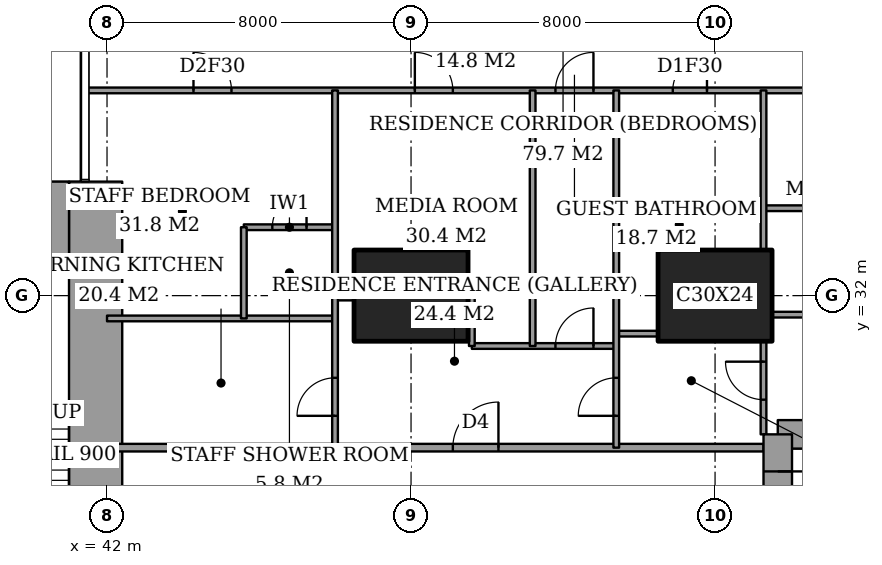
"""IFC4 building model, lengths in metres.
Left out: names, types, materials, properties, quantities, classifications, styles, units other than length and angle.
Written with IfcOpenShell. Run it as: python <this file> out.ifc"""

import sys

from ifc_helpers import new_model, si_unit, direction, frame, frame_2d, origin, origin_2d, place, context, subcontext, project, spatial, rectangle, extrude, element, fill, save


model = new_model("IFC4")
c1 = context("Model", 3, precision=1e-05, world=origin(), true_north=direction((0.0, 1.0)))
c2 = subcontext(c1, "Body", "Model", "MODEL_VIEW")
j1 = project(units=[si_unit("LENGTHUNIT", "METRE"), si_unit("PLANEANGLEUNIT", "RADIAN")], contexts=[c1])
p1 = place(None, origin())
s1 = spatial("IfcSite", under=j1, at=p1, CompositionType="ELEMENT")
p2 = place(p1, origin())
s2 = spatial("IfcBuilding", under=s1, at=p2, CompositionType="ELEMENT")
p3 = place(p2, frame((0.0, 0.0, 161.0)))
s3 = spatial("IfcBuildingStorey", under=s2, at=p3, CompositionType="ELEMENT", Elevation=161.0)
for number, where, z_axis, x_axis in (
    (1, (50.0, 32.0, 0.0), (0.0, 0.0, 1.0), (1.0, 0.0, 0.0)),
    (2, (58.0, 32.0, 0.0), (0.0, 0.0, 1.0), (1.0, 0.0, 0.0)),
):
    element("IfcColumn", number, at=place(p3, frame(where, z_axis=z_axis, x_axis=x_axis)), inside=s3, PredefinedType="COLUMN", context=c2, shape_type="SweptSolid", body=[
        extrude(rectangle(XDim=3.0, YDim=2.4, at=origin_2d()), origin(), (0.0, 0.0, 1.0), 3.6),
    ])
p4 = place(p3, frame((37.85, 34.0, 0.0), z_axis=(0.0, 0.0, 1.0), x_axis=(1.0, 0.0, 0.0)))
e3 = element("IfcWall", 3, at=p4, inside=s3, PredefinedType="SHEAR", context=c2, shape_type="SweptSolid", body=[
    extrude(rectangle(XDim=3.15, YDim=2.0, at=frame_2d((1.575, 0.0))), origin(), (0.0, 0.0, 1.0), 3.6),
])
p5 = place(p3, frame((41.7, 24.85, 0.0), z_axis=(0.0, 0.0, 1.0), x_axis=(0.0, 1.0, 0.0)))
e4 = element("IfcWall", 4, at=p5, inside=s3, PredefinedType="SHEAR", context=c2, shape_type="SweptSolid", body=[
    extrude(rectangle(XDim=10.15, YDim=1.4, at=frame_2d((5.075, 0.0))), origin(), (0.0, 0.0, 1.0), 3.6),
])
p6 = place(p3, frame((64.1, 28.35, 0.0), z_axis=(0.0, 0.0, 1.0), x_axis=(-1.0, 0.0, 0.0)))
e5 = element("IfcWall", 5, at=p6, inside=s3, PredefinedType="SHEAR", context=c2, shape_type="SweptSolid", body=[
    extrude(rectangle(XDim=4.45, YDim=0.75, at=frame_2d((2.225, 0.0))), origin(), (0.0, 0.0, 1.0), 3.6),
])
p7 = place(p3, frame((59.65, 28.35, 0.0), z_axis=(0.0, 0.0, 1.0), x_axis=(0.0, -1.0, 0.0)))
e6 = element("IfcWall", 6, at=p7, inside=s3, PredefinedType="SHEAR", context=c2, shape_type="SweptSolid", body=[
    extrude(rectangle(XDim=8.7, YDim=0.75, at=frame_2d((4.35, 0.0))), origin(), (0.0, 0.0, 1.0), 3.6),
])
p8 = place(p7, frame((0.975, 0.0, 0.0)))
e7 = element("IfcOpeningElement", 7, at=p8, cuts=e6, PredefinedType="OPENING", context=c2, shape_type="SweptSolid", body=[
    extrude(rectangle(XDim=1.0, YDim=2.1, at=frame_2d((0.5, 1.05))), frame((0.0, 0.385, 0.0), z_axis=(0.0, -1.0, 0.0), x_axis=(1.0, 0.0, 0.0)), (0.0, 0.0, 1.0), 0.77),
])
p9 = place(p3, frame((42.0, 28.0, 0.0), z_axis=(0.0, 0.0, 1.0), x_axis=(1.0, 0.0, 0.0)))
e8 = element("IfcWall", 8, at=p9, inside=s3, PredefinedType="PARTITIONING", context=c2, shape_type="SweptSolid", body=[
    extrude(rectangle(XDim=17.275, YDim=0.2, at=frame_2d((8.637, 0.0))), origin(), (0.0, 0.0, 1.0), 3.35),
])
p10 = place(p9, frame((9.1, 0.0, 0.0)))
e9 = element("IfcOpeningElement", 9, at=p10, cuts=e8, PredefinedType="OPENING", context=c2, shape_type="SweptSolid", body=[
    extrude(rectangle(XDim=1.2, YDim=2.4, at=frame_2d((0.6, 1.2))), frame((0.0, 0.11, 0.0), z_axis=(0.0, -1.0, 0.0), x_axis=(1.0, 0.0, 0.0)), (0.0, 0.0, 1.0), 0.22),
])
p11 = place(p3, frame((51.6, 30.675, 0.0), z_axis=(0.0, 0.0, 1.0), x_axis=(1.0, 0.0, 0.0)))
e10 = element("IfcWall", 10, at=p11, inside=s3, PredefinedType="PARTITIONING", context=c2, shape_type="SweptSolid", body=[
    extrude(rectangle(XDim=3.8, YDim=0.15, at=frame_2d((1.9, 0.0))), origin(), (0.0, 0.0, 1.0), 3.35),
])
p12 = place(p11, frame((2.2, 0.0, 0.0)))
e11 = element("IfcOpeningElement", 11, at=p12, cuts=e10, PredefinedType="OPENING", context=c2, shape_type="SweptSolid", body=[
    extrude(rectangle(XDim=1.0, YDim=2.1, at=frame_2d((0.5, 1.05))), frame((0.0, 0.085, 0.0), z_axis=(0.0, -1.0, 0.0), x_axis=(1.0, 0.0, 0.0)), (0.0, 0.0, 1.0), 0.17),
])
p13 = place(p3, frame((55.4, 31.0, 0.0), z_axis=(0.0, 0.0, 1.0), x_axis=(1.0, 0.0, 0.0)))
e12 = element("IfcWall", 12, at=p13, inside=s3, PredefinedType="PARTITIONING", context=c2, shape_type="SweptSolid", body=[
    extrude(rectangle(XDim=1.1, YDim=0.15, at=frame_2d((0.55, 0.0))), origin(), (0.0, 0.0, 1.0), 3.35),
])
p14 = place(p3, frame((42.0, 31.4, 0.0), z_axis=(0.0, 0.0, 1.0), x_axis=(1.0, 0.0, 0.0)))
e13 = element("IfcWall", 13, at=p14, inside=s3, PredefinedType="PARTITIONING", context=c2, shape_type="SweptSolid", body=[
    extrude(rectangle(XDim=6.0, YDim=0.15, at=frame_2d((3.0, 0.0))), origin(), (0.0, 0.0, 1.0), 3.35),
])
p15 = place(p3, frame((59.5, 31.5, 0.0), z_axis=(0.0, 0.0, 1.0), x_axis=(1.0, 0.0, 0.0)))
e14 = element("IfcWall", 14, at=p15, inside=s3, PredefinedType="PARTITIONING", context=c2, shape_type="SweptSolid", body=[
    extrude(rectangle(XDim=5.15, YDim=0.15, at=frame_2d((2.575, 0.0))), origin(), (0.0, 0.0, 1.0), 3.35),
])
p16 = place(p3, frame((48.0, 31.95, 0.0), z_axis=(0.0, 0.0, 1.0), x_axis=(1.0, 0.0, 0.0)))
e15 = element("IfcWall", 15, at=p16, inside=s3, PredefinedType="PARTITIONING", context=c2, shape_type="SweptSolid", body=[
    extrude(rectangle(XDim=0.5, YDim=0.15, at=frame_2d((0.25, 0.0))), origin(), (0.0, 0.0, 1.0), 2.634),
])
p17 = place(p3, frame((45.6, 33.8, 0.0), z_axis=(0.0, 0.0, 1.0), x_axis=(1.0, 0.0, 0.0)))
e16 = element("IfcWall", 16, at=p17, inside=s3, PredefinedType="PARTITIONING", context=c2, shape_type="SweptSolid", body=[
    extrude(rectangle(XDim=2.4, YDim=0.15, at=frame_2d((1.2, 0.0))), origin(), (0.0, 0.0, 1.0), 3.35),
])
p18 = place(p17, frame((0.75, 0.0, 0.0)))
e17 = element("IfcOpeningElement", 17, at=p18, cuts=e16, PredefinedType="OPENING", context=c2, shape_type="SweptSolid", body=[
    extrude(rectangle(XDim=0.9, YDim=2.1, at=frame_2d((0.45, 1.05))), frame((0.0, 0.085, 0.0), z_axis=(0.0, -1.0, 0.0), x_axis=(1.0, 0.0, 0.0)), (0.0, 0.0, 1.0), 0.17),
])
p19 = place(p3, frame((59.275, 34.3, 0.0), z_axis=(0.0, 0.0, 1.0), x_axis=(1.0, 0.0, 0.0)))
e18 = element("IfcWall", 18, at=p19, inside=s3, PredefinedType="PARTITIONING", context=c2, shape_type="SweptSolid", body=[
    extrude(rectangle(XDim=2.6, YDim=0.15, at=frame_2d((1.3, 0.0))), origin(), (0.0, 0.0, 1.0), 3.35),
])
p20 = place(p3, frame((41.439, 37.4, 0.0), z_axis=(0.0, 0.0, 1.0), x_axis=(1.0, 0.0, 0.0)))
e19 = element("IfcWall", 19, at=p20, inside=s3, PredefinedType="PARTITIONING", context=c2, shape_type="SweptSolid", body=[
    extrude(rectangle(XDim=25.011, YDim=0.15, at=frame_2d((12.505, 0.0))), origin(), (0.0, 0.0, 1.0), 3.35),
])
p21 = place(p20, frame((12.361, 0.0, 0.0)))
e20 = element("IfcOpeningElement", 20, at=p21, cuts=e19, PredefinedType="OPENING", context=c2, shape_type="SweptSolid", body=[
    extrude(rectangle(XDim=1.0, YDim=2.1, at=frame_2d((0.5, 1.05))), frame((0.0, 0.085, 0.0), z_axis=(0.0, -1.0, 0.0), x_axis=(1.0, 0.0, 0.0)), (0.0, 0.0, 1.0), 0.17),
])
p22 = place(p20, frame((20.924, 0.0, 0.0)))
e21 = element("IfcOpeningElement", 21, at=p22, cuts=e19, PredefinedType="OPENING", context=c2, shape_type="SweptSolid", body=[
    extrude(rectangle(XDim=1.0, YDim=2.1, at=frame_2d((0.5, 1.05))), frame((0.0, 0.085, 0.0), z_axis=(0.0, -1.0, 0.0), x_axis=(1.0, 0.0, 0.0)), (0.0, 0.0, 1.0), 0.17),
])
p23 = place(p20, frame((15.448, 0.0, 0.0)))
e22 = element("IfcOpeningElement", 22, at=p23, cuts=e19, PredefinedType="OPENING", context=c2, shape_type="SweptSolid", body=[
    extrude(rectangle(XDim=0.9, YDim=2.1, at=frame_2d((0.45, 1.05))), frame((0.0, 0.085, 0.0), z_axis=(0.0, -1.0, 0.0), x_axis=(1.0, 0.0, 0.0)), (0.0, 0.0, 1.0), 0.17),
])
p24 = place(p20, frame((8.661, 0.0, 0.0)))
e23 = element("IfcOpeningElement", 23, at=p24, cuts=e19, PredefinedType="OPENING", context=c2, shape_type="SweptSolid", body=[
    extrude(rectangle(XDim=1.0, YDim=2.1, at=frame_2d((0.5, 1.05))), frame((0.0, 0.085, 0.0), z_axis=(0.0, -1.0, 0.0), x_axis=(1.0, 0.0, 0.0)), (0.0, 0.0, 1.0), 0.17),
])
p25 = place(p20, frame((2.836, 0.0, 0.0)))
e24 = element("IfcOpeningElement", 24, at=p25, cuts=e19, PredefinedType="OPENING", context=c2, shape_type="SweptSolid", body=[
    extrude(rectangle(XDim=1.0, YDim=2.1, at=frame_2d((0.5, 1.05))), frame((0.0, 0.085, 0.0), z_axis=(0.0, -1.0, 0.0), x_axis=(1.0, 0.0, 0.0)), (0.0, 0.0, 1.0), 0.17),
])
p26 = place(p3, frame((45.6, 31.4, 0.0), z_axis=(0.0, 0.0, 1.0), x_axis=(0.0, 1.0, 0.0)))
e25 = element("IfcWall", 25, at=p26, inside=s3, PredefinedType="PARTITIONING", context=c2, shape_type="SweptSolid", body=[
    extrude(rectangle(XDim=2.4, YDim=0.15, at=frame_2d((1.2, 0.0))), origin(), (0.0, 0.0, 1.0), 3.35),
])
p27 = place(p3, frame((48.0, 28.0, 0.0), z_axis=(0.0, 0.0, 1.0), x_axis=(0.0, 1.0, 0.0)))
e26 = element("IfcWall", 26, at=p27, inside=s3, PredefinedType="PARTITIONING", context=c2, shape_type="SweptSolid", body=[
    extrude(rectangle(XDim=9.4, YDim=0.15, at=frame_2d((4.7, 0.0))), origin(), (0.0, 0.0, 1.0), 3.35),
])
p28 = place(p27, frame((0.837, 0.0, 0.0)))
e27 = element("IfcOpeningElement", 27, at=p28, cuts=e26, PredefinedType="OPENING", context=c2, shape_type="SweptSolid", body=[
    extrude(rectangle(XDim=1.0, YDim=2.1, at=frame_2d((0.5, 1.05))), frame((0.0, 0.085, 0.0), z_axis=(0.0, -1.0, 0.0), x_axis=(1.0, 0.0, 0.0)), (0.0, 0.0, 1.0), 0.17),
])
p29 = place(p3, frame((51.6, 30.675, 0.0), z_axis=(0.0, 0.0, 1.0), x_axis=(0.0, 1.0, 0.0)))
e28 = element("IfcWall", 28, at=p29, inside=s3, PredefinedType="PARTITIONING", context=c2, shape_type="SweptSolid", body=[
    extrude(rectangle(XDim=1.275, YDim=0.15, at=frame_2d((0.637, 0.0))), origin(), (0.0, 0.0, 1.0), 3.35),
])
p30 = place(p3, frame((53.2, 30.675, 0.0), z_axis=(0.0, 0.0, 1.0), x_axis=(0.0, 1.0, 0.0)))
e29 = element("IfcWall", 29, at=p30, inside=s3, PredefinedType="PARTITIONING", context=c2, shape_type="SweptSolid", body=[
    extrude(rectangle(XDim=6.725, YDim=0.15, at=frame_2d((3.362, 0.0))), origin(), (0.0, 0.0, 1.0), 3.35),
])
p31 = place(p3, frame((55.4, 28.0, 0.0), z_axis=(0.0, 0.0, 1.0), x_axis=(0.0, 1.0, 0.0)))
e30 = element("IfcWall", 30, at=p31, inside=s3, PredefinedType="PARTITIONING", context=c2, shape_type="SweptSolid", body=[
    extrude(rectangle(XDim=9.4, YDim=0.15, at=frame_2d((4.7, 0.0))), origin(), (0.0, 0.0, 1.0), 3.35),
])
p32 = place(p31, frame((0.837, 0.0, 0.0)))
e31 = element("IfcOpeningElement", 31, at=p32, cuts=e30, PredefinedType="OPENING", context=c2, shape_type="SweptSolid", body=[
    extrude(rectangle(XDim=1.0, YDim=2.1, at=frame_2d((0.5, 1.05))), frame((0.0, 0.085, 0.0), z_axis=(0.0, -1.0, 0.0), x_axis=(1.0, 0.0, 0.0)), (0.0, 0.0, 1.0), 0.17),
])
p33 = place(p3, frame((59.275, 28.35, 0.0), z_axis=(0.0, 0.0, 1.0), x_axis=(0.0, 1.0, 0.0)))
e32 = element("IfcWall", 32, at=p33, inside=s3, PredefinedType="PARTITIONING", context=c2, shape_type="SweptSolid", body=[
    extrude(rectangle(XDim=2.45, YDim=0.15, at=frame_2d((1.225, 0.0))), origin(), (0.0, 0.0, 1.0), 3.35),
])
p34 = place(p33, frame((0.913, 0.0, 0.0)))
e33 = element("IfcOpeningElement", 33, at=p34, cuts=e32, PredefinedType="OPENING", context=c2, shape_type="SweptSolid", body=[
    extrude(rectangle(XDim=1.0, YDim=2.1, at=frame_2d((0.5, 1.05))), frame((0.0, 0.085, 0.0), z_axis=(0.0, -1.0, 0.0), x_axis=(1.0, 0.0, 0.0)), (0.0, 0.0, 1.0), 0.17),
])
p35 = place(p3, frame((59.275, 33.2, 0.0), z_axis=(0.0, 0.0, 1.0), x_axis=(0.0, 1.0, 0.0)))
e34 = element("IfcWall", 34, at=p35, inside=s3, PredefinedType="PARTITIONING", context=c2, shape_type="SweptSolid", body=[
    extrude(rectangle(XDim=4.2, YDim=0.15, at=frame_2d((2.1, 0.0))), origin(), (0.0, 0.0, 1.0), 3.35),
])
p36 = place(p21, origin())
e35 = element("IfcDoor", 35, at=p36, inside=s3, OperationType="SINGLE_SWING_LEFT", PredefinedType="DOOR", context=c2, shape_type="SweptSolid", body=[
    extrude(rectangle(XDim=1.0, YDim=2.1, at=frame_2d((0.5, 1.05))), frame((0.0, 0.025, 0.0), z_axis=(0.0, -1.0, 0.0), x_axis=(1.0, 0.0, 0.0)), (0.0, 0.0, 1.0), 0.05),
])
fill(e20, e35)
p37 = place(p34, origin())
e36 = element("IfcDoor", 36, at=p37, inside=s3, OperationType="SINGLE_SWING_LEFT", PredefinedType="DOOR", context=c2, shape_type="SweptSolid", body=[
    extrude(rectangle(XDim=1.0, YDim=2.1, at=frame_2d((0.5, 1.05))), frame((0.0, 0.025, 0.0), z_axis=(0.0, -1.0, 0.0), x_axis=(1.0, 0.0, 0.0)), (0.0, 0.0, 1.0), 0.05),
])
fill(e33, e36)
p38 = place(p23, origin())
e37 = element("IfcDoor", 37, at=p38, inside=s3, OperationType="SINGLE_SWING_LEFT", PredefinedType="DOOR", context=c2, shape_type="SweptSolid", body=[
    extrude(rectangle(XDim=0.9, YDim=2.1, at=frame_2d((0.45, 1.05))), frame((0.0, 0.025, 0.0), z_axis=(0.0, -1.0, 0.0), x_axis=(1.0, 0.0, 0.0)), (0.0, 0.0, 1.0), 0.05),
])
fill(e22, e37)
p39 = place(p32, origin())
e38 = element("IfcDoor", 38, at=p39, inside=s3, OperationType="SINGLE_SWING_RIGHT", PredefinedType="DOOR", context=c2, shape_type="SweptSolid", body=[
    extrude(rectangle(XDim=1.0, YDim=2.1, at=frame_2d((0.5, 1.05))), frame((0.0, 0.025, 0.0), z_axis=(0.0, -1.0, 0.0), x_axis=(1.0, 0.0, 0.0)), (0.0, 0.0, 1.0), 0.05),
])
fill(e31, e38)
p40 = place(p10, origin())
e39 = element("IfcDoor", 39, at=p40, inside=s3, OperationType="SINGLE_SWING_LEFT", PredefinedType="DOOR", context=c2, shape_type="SweptSolid", body=[
    extrude(rectangle(XDim=1.2, YDim=2.4, at=frame_2d((0.6, 1.2))), frame((0.0, 0.025, 0.0), z_axis=(0.0, -1.0, 0.0), x_axis=(1.0, 0.0, 0.0)), (0.0, 0.0, 1.0), 0.05),
])
fill(e9, e39)
p41 = place(p12, origin())
e40 = element("IfcDoor", 40, at=p41, inside=s3, OperationType="SINGLE_SWING_LEFT", PredefinedType="DOOR", context=c2, shape_type="SweptSolid", body=[
    extrude(rectangle(XDim=1.0, YDim=2.1, at=frame_2d((0.5, 1.05))), frame((0.0, 0.025, 0.0), z_axis=(0.0, -1.0, 0.0), x_axis=(1.0, 0.0, 0.0)), (0.0, 0.0, 1.0), 0.05),
])
fill(e11, e40)
p42 = place(p24, origin())
e41 = element("IfcDoor", 41, at=p42, inside=s3, OperationType="SINGLE_SWING_RIGHT", PredefinedType="DOOR", context=c2, shape_type="SweptSolid", body=[
    extrude(rectangle(XDim=1.0, YDim=2.1, at=frame_2d((0.5, 1.05))), frame((0.0, 0.025, 0.0), z_axis=(0.0, -1.0, 0.0), x_axis=(1.0, 0.0, 0.0)), (0.0, 0.0, 1.0), 0.05),
])
fill(e23, e41)
p43 = place(p18, origin())
e42 = element("IfcDoor", 42, at=p43, inside=s3, OperationType="SINGLE_SWING_LEFT", PredefinedType="DOOR", context=c2, shape_type="SweptSolid", body=[
    extrude(rectangle(XDim=0.9, YDim=2.1, at=frame_2d((0.45, 1.05))), frame((0.0, 0.025, 0.0), z_axis=(0.0, -1.0, 0.0), x_axis=(1.0, 0.0, 0.0)), (0.0, 0.0, 1.0), 0.05),
])
fill(e17, e42)
p44 = place(p25, origin())
e43 = element("IfcDoor", 43, at=p44, inside=s3, OperationType="SINGLE_SWING_RIGHT", PredefinedType="DOOR", context=c2, shape_type="SweptSolid", body=[
    extrude(rectangle(XDim=1.0, YDim=2.1, at=frame_2d((0.5, 1.05))), frame((0.0, 0.025, 0.0), z_axis=(0.0, -1.0, 0.0), x_axis=(1.0, 0.0, 0.0)), (0.0, 0.0, 1.0), 0.05),
])
fill(e24, e43)
p45 = place(p28, origin())
e44 = element("IfcDoor", 44, at=p45, inside=s3, OperationType="SINGLE_SWING_RIGHT", PredefinedType="DOOR", context=c2, shape_type="SweptSolid", body=[
    extrude(rectangle(XDim=1.0, YDim=2.1, at=frame_2d((0.5, 1.05))), frame((0.0, 0.025, 0.0), z_axis=(0.0, -1.0, 0.0), x_axis=(1.0, 0.0, 0.0)), (0.0, 0.0, 1.0), 0.05),
])
fill(e27, e44)
p46 = place(p8, origin())
e45 = element("IfcDoor", 45, at=p46, inside=s3, OperationType="SINGLE_SWING_RIGHT", PredefinedType="DOOR", context=c2, shape_type="SweptSolid", body=[
    extrude(rectangle(XDim=1.0, YDim=2.1, at=frame_2d((0.5, 1.05))), frame((0.0, 0.025, 0.0), z_axis=(0.0, -1.0, 0.0), x_axis=(1.0, 0.0, 0.0)), (0.0, 0.0, 1.0), 0.05),
])
fill(e7, e45)
save(model, sys.argv[1])
